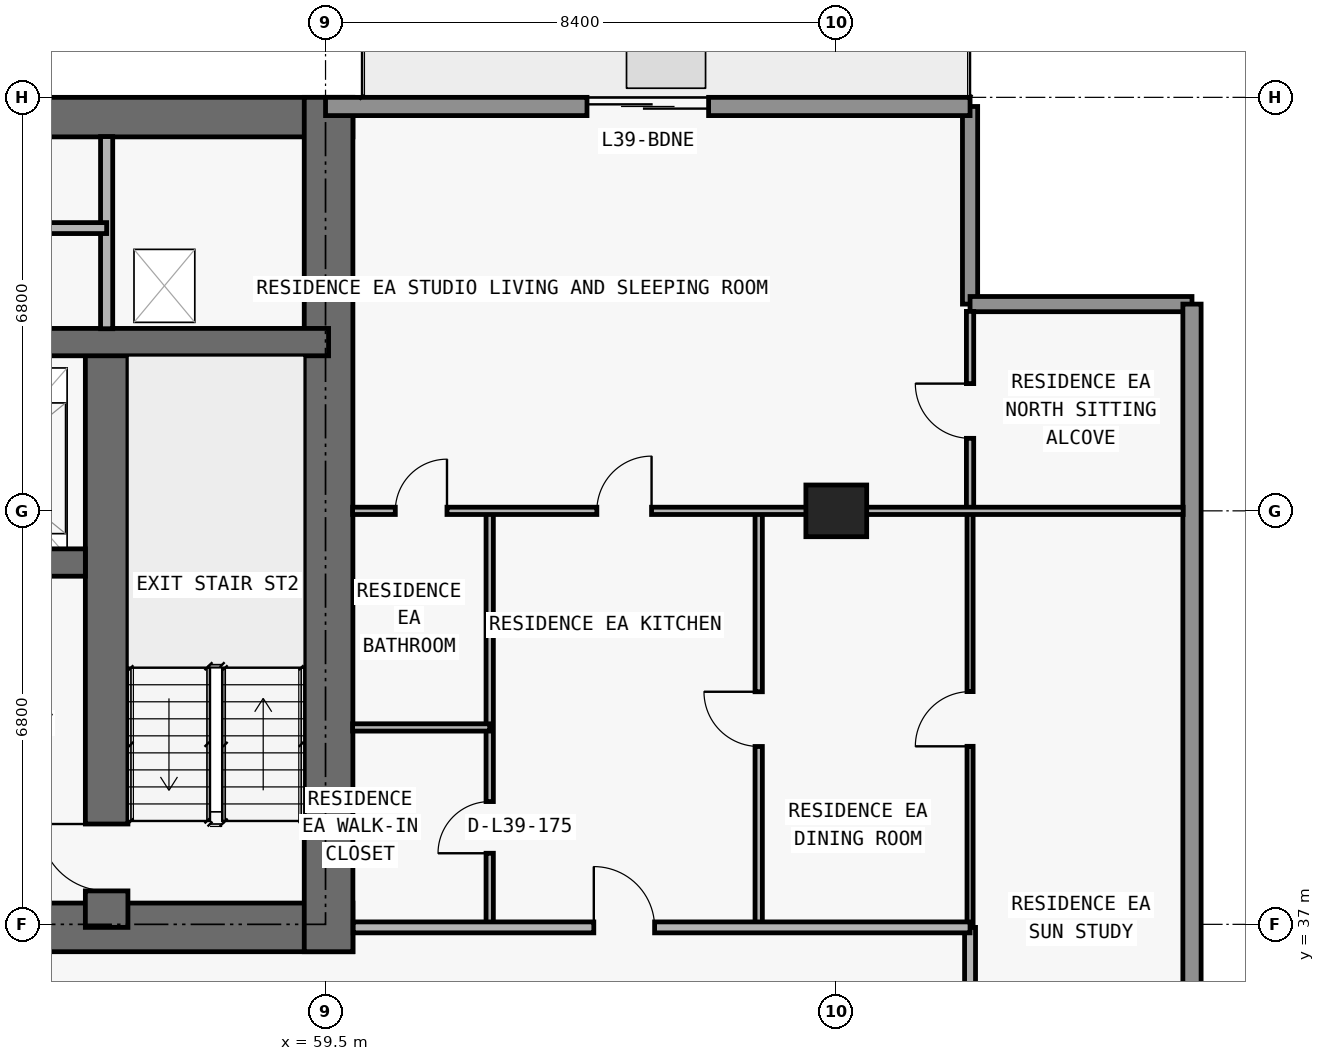
"""IFC4 building model, lengths in metres.
Left out: names, types, materials, properties, quantities, classifications, styles, units other than length and angle.
Written with IfcOpenShell. Run it as: python <this file> out.ifc"""

import sys

from ifc_helpers import new_model, si_unit, direction, frame, frame_2d, origin, origin_2d, place, context, subcontext, project, spatial, rectangle, extrude, element, fill, save


model = new_model("IFC4")
c1 = context("Model", 3, precision=1e-05, world=origin(), true_north=direction((0.0, 1.0)))
c2 = subcontext(c1, "Body", "Model", "MODEL_VIEW")
j1 = project(units=[si_unit("LENGTHUNIT", "METRE"), si_unit("PLANEANGLEUNIT", "RADIAN")], contexts=[c1])
p1 = place(None, origin())
s1 = spatial("IfcSite", under=j1, at=p1, CompositionType="ELEMENT")
p2 = place(p1, origin())
s2 = spatial("IfcBuilding", under=s1, at=p2, CompositionType="ELEMENT")
p3 = place(p2, frame((0.0, 0.0, 142.2)))
s3 = spatial("IfcBuildingStorey", under=s2, at=p3, CompositionType="ELEMENT", Elevation=142.2)
p4 = place(p3, frame((67.9, 43.8, 0.0), z_axis=(0.0, 0.0, 1.0), x_axis=(1.0, 0.0, 0.0)))
e1 = element("IfcColumn", 1, at=p4, inside=s3, PredefinedType="COLUMN", context=c2, shape_type="SweptSolid", body=[
    extrude(rectangle(XDim=1.0, YDim=0.85, at=origin_2d()), origin(), (0.0, 0.0, 1.0), 3.05),
])
p5 = place(p3, frame((17.85, 36.95, 0.0), z_axis=(0.0, 0.0, 1.0), x_axis=(1.0, 0.0, 0.0)))
e2 = element("IfcWall", 2, at=p5, inside=s3, PredefinedType="SHEAR", context=c2, shape_type="SweptSolid", body=[
    extrude(rectangle(XDim=42.1, YDim=0.8, at=frame_2d((21.05, 0.0))), origin(), (0.0, 0.0, 1.0), 3.05),
])
p6 = place(p5, frame((14.45, 0.0, 0.0)))
e3 = element("IfcOpeningElement", 3, at=p6, cuts=e2, PredefinedType="OPENING", context=c2, shape_type="SweptSolid", body=[
    extrude(rectangle(XDim=1.1, YDim=2.15, at=frame_2d((0.55, 1.075))), frame((0.0, 0.41, 0.0), z_axis=(0.0, -1.0, 0.0), x_axis=(1.0, 0.0, 0.0)), (0.0, 0.0, 1.0), 0.82),
])
p7 = place(p5, frame((6.3, 0.0, 0.0)))
e4 = element("IfcOpeningElement", 4, at=p7, cuts=e2, PredefinedType="OPENING", context=c2, shape_type="SweptSolid", body=[
    extrude(rectangle(XDim=1.05, YDim=2.15, at=frame_2d((0.525, 1.075))), frame((0.0, 0.41, 0.0), z_axis=(0.0, -1.0, 0.0), x_axis=(1.0, 0.0, 0.0)), (0.0, 0.0, 1.0), 0.82),
])
p8 = place(p5, frame((34.8, 0.0, 0.0)))
e5 = element("IfcOpeningElement", 5, at=p8, cuts=e2, PredefinedType="OPENING", context=c2, shape_type="SweptSolid", body=[
    extrude(rectangle(XDim=1.05, YDim=2.15, at=frame_2d((0.525, 1.075))), frame((0.0, 0.41, 0.0), z_axis=(0.0, -1.0, 0.0), x_axis=(1.0, 0.0, 0.0)), (0.0, 0.0, 1.0), 0.82),
])
p9 = place(p5, frame((10.913, 0.0, 0.0)))
e6 = element("IfcOpeningElement", 6, at=p9, cuts=e2, PredefinedType="OPENING", context=c2, shape_type="SweptSolid", body=[
    extrude(rectangle(XDim=1.05, YDim=2.15, at=frame_2d((0.525, 1.075))), frame((0.0, 0.41, 0.0), z_axis=(0.0, -1.0, 0.0), x_axis=(1.0, 0.0, 0.0)), (0.0, 0.0, 1.0), 0.82),
])
p10 = place(p5, frame((24.15, 0.0, 0.0)))
e7 = element("IfcOpeningElement", 7, at=p10, cuts=e2, PredefinedType="OPENING", context=c2, shape_type="SweptSolid", body=[
    extrude(rectangle(XDim=1.05, YDim=2.15, at=frame_2d((0.525, 1.075))), frame((0.0, 0.41, 0.0), z_axis=(0.0, -1.0, 0.0), x_axis=(1.0, 0.0, 0.0)), (0.0, 0.0, 1.0), 0.82),
])
p11 = place(p3, frame((17.85, 50.275, 0.0), z_axis=(0.0, 0.0, 1.0), x_axis=(1.0, 0.0, 0.0)))
e8 = element("IfcWall", 8, at=p11, inside=s3, PredefinedType="SHEAR", context=c2, shape_type="SweptSolid", body=[
    extrude(rectangle(XDim=42.1, YDim=0.65, at=frame_2d((21.05, 0.0))), origin(), (0.0, 0.0, 1.0), 3.05),
])
p12 = place(p3, frame((59.55, 36.55, 0.0), z_axis=(0.0, 0.0, 1.0), x_axis=(0.0, 1.0, 0.0)))
e9 = element("IfcWall", 9, at=p12, inside=s3, PredefinedType="SHEAR", context=c2, shape_type="SweptSolid", body=[
    extrude(rectangle(XDim=14.05, YDim=0.8, at=frame_2d((7.025, 0.0))), origin(), (0.0, 0.0, 1.0), 3.05),
])
p13 = place(p3, frame((55.9, 36.95, 0.0), z_axis=(0.0, 0.0, 1.0), x_axis=(0.0, 1.0, 0.0)))
e10 = element("IfcWall", 10, at=p13, inside=s3, PredefinedType="SHEAR", context=c2, shape_type="SweptSolid", body=[
    extrude(rectangle(XDim=9.625, YDim=0.7, at=frame_2d((4.812, 0.0))), origin(), (0.0, 0.0, 1.0), 3.05),
])
p14 = place(p13, frame((0.6, 0.0, 0.0)))
e11 = element("IfcOpeningElement", 11, at=p14, cuts=e10, PredefinedType="OPENING", context=c2, shape_type="SweptSolid", body=[
    extrude(rectangle(XDim=1.1, YDim=2.15, at=frame_2d((0.55, 1.075))), frame((0.0, 0.36, 0.0), z_axis=(0.0, -1.0, 0.0), x_axis=(1.0, 0.0, 0.0)), (0.0, 0.0, 1.0), 0.72),
])
p15 = place(p3, frame((22.25, 42.95, 0.0), z_axis=(0.0, 0.0, 1.0), x_axis=(1.0, 0.0, 0.0)))
e12 = element("IfcWall", 12, at=p15, inside=s3, PredefinedType="SHEAR", context=c2, shape_type="SweptSolid", body=[
    extrude(rectangle(XDim=33.3, YDim=0.45, at=frame_2d((16.65, 0.0))), origin(), (0.0, 0.0, 1.0), 3.05),
])
p16 = place(p15, frame((1.05, 0.0, 0.0)))
e13 = element("IfcOpeningElement", 13, at=p16, cuts=e12, PredefinedType="OPENING", context=c2, shape_type="SweptSolid", body=[
    extrude(rectangle(XDim=1.2, YDim=2.2, at=frame_2d((0.6, 1.1))), frame((0.0, 0.235, 0.0), z_axis=(0.0, -1.0, 0.0), x_axis=(1.0, 0.0, 0.0)), (0.0, 0.0, 1.0), 0.47),
])
p17 = place(p15, frame((31.05, 0.0, 0.0)))
e14 = element("IfcOpeningElement", 14, at=p17, cuts=e12, PredefinedType="OPENING", context=c2, shape_type="SweptSolid", body=[
    extrude(rectangle(XDim=1.2, YDim=2.2, at=frame_2d((0.6, 1.1))), frame((0.0, 0.235, 0.0), z_axis=(0.0, -1.0, 0.0), x_axis=(1.0, 0.0, 0.0)), (0.0, 0.0, 1.0), 0.47),
])
p18 = place(p15, frame((21.4, 0.0, 0.0)))
e15 = element("IfcOpeningElement", 15, at=p18, cuts=e12, PredefinedType="OPENING", context=c2, shape_type="SweptSolid", body=[
    extrude(rectangle(XDim=1.1, YDim=2.2, at=frame_2d((0.55, 1.1))), frame((0.0, 0.235, 0.0), z_axis=(0.0, -1.0, 0.0), x_axis=(1.0, 0.0, 0.0)), (0.0, 0.0, 1.0), 0.47),
])
p19 = place(p15, frame((24.0, 0.0, 0.0)))
e16 = element("IfcOpeningElement", 16, at=p19, cuts=e12, PredefinedType="OPENING", context=c2, shape_type="SweptSolid", body=[
    extrude(rectangle(XDim=1.1, YDim=2.2, at=frame_2d((0.55, 1.1))), frame((0.0, 0.235, 0.0), z_axis=(0.0, -1.0, 0.0), x_axis=(1.0, 0.0, 0.0)), (0.0, 0.0, 1.0), 0.47),
])
p20 = place(p15, frame((3.625, 0.0, 0.0)))
e17 = element("IfcOpeningElement", 17, at=p20, cuts=e12, PredefinedType="OPENING", context=c2, shape_type="SweptSolid", body=[
    extrude(rectangle(XDim=1.05, YDim=2.15, at=frame_2d((0.525, 1.075))), frame((0.0, 0.235, 0.0), z_axis=(0.0, -1.0, 0.0), x_axis=(1.0, 0.0, 0.0)), (0.0, 0.0, 1.0), 0.47),
])
p21 = place(p15, frame((28.675, 0.0, 0.0)))
e18 = element("IfcOpeningElement", 18, at=p21, cuts=e12, PredefinedType="OPENING", context=c2, shape_type="SweptSolid", body=[
    extrude(rectangle(XDim=1.05, YDim=2.15, at=frame_2d((0.525, 1.075))), frame((0.0, 0.235, 0.0), z_axis=(0.0, -1.0, 0.0), x_axis=(1.0, 0.0, 0.0)), (0.0, 0.0, 1.0), 0.47),
])
p22 = place(p15, frame((15.975, 0.0, 0.0)))
e19 = element("IfcOpeningElement", 19, at=p22, cuts=e12, PredefinedType="OPENING", context=c2, shape_type="SweptSolid", body=[
    extrude(rectangle(XDim=1.0, YDim=2.2, at=frame_2d((0.5, 1.1))), frame((0.0, 0.235, 0.0), z_axis=(0.0, -1.0, 0.0), x_axis=(1.0, 0.0, 0.0)), (0.0, 0.0, 1.0), 0.47),
])
p23 = place(p3, frame((18.25, 46.575, 0.0), z_axis=(0.0, 0.0, 1.0), x_axis=(1.0, 0.0, 0.0)))
e20 = element("IfcWall", 20, at=p23, inside=s3, PredefinedType="SHEAR", context=c2, shape_type="SweptSolid", body=[
    extrude(rectangle(XDim=41.3, YDim=0.45, at=frame_2d((20.65, 0.0))), origin(), (0.0, 0.0, 1.0), 3.05),
])
p24 = place(p23, frame((7.65, 0.0, 0.0)))
e21 = element("IfcOpeningElement", 21, at=p24, cuts=e20, PredefinedType="OPENING", context=c2, shape_type="SweptSolid", body=[
    extrude(rectangle(XDim=1.0, YDim=2.2, at=frame_2d((0.5, 1.1))), frame((0.0, 0.235, 0.0), z_axis=(0.0, -1.0, 0.0), x_axis=(1.0, 0.0, 0.0)), (0.0, 0.0, 1.0), 0.47),
])
p25 = place(p23, frame((32.675, 0.0, 0.0)))
e22 = element("IfcOpeningElement", 22, at=p25, cuts=e20, PredefinedType="OPENING", context=c2, shape_type="SweptSolid", body=[
    extrude(rectangle(XDim=1.05, YDim=2.15, at=frame_2d((0.525, 1.075))), frame((0.0, 0.235, 0.0), z_axis=(0.0, -1.0, 0.0), x_axis=(1.0, 0.0, 0.0)), (0.0, 0.0, 1.0), 0.47),
])
p26 = place(p3, frame((70.1, 50.45, 0.0), z_axis=(0.0, 0.0, 1.0), x_axis=(0.0, -1.0, 0.0)))
e23 = element("IfcWall", 23, at=p26, inside=s3, PredefinedType="ELEMENTEDWALL", context=c2, shape_type="SweptSolid", body=[
    extrude(rectangle(XDim=3.25, YDim=0.25, at=frame_2d((1.625, 0.0))), origin(), (0.0, 0.0, 1.0), 3.05),
])
p27 = place(p3, frame((70.1, 47.2, 0.0), z_axis=(0.0, 0.0, 1.0), x_axis=(1.0, 0.0, 0.0)))
e24 = element("IfcWall", 24, at=p27, inside=s3, PredefinedType="ELEMENTEDWALL", context=c2, shape_type="SweptSolid", body=[
    extrude(rectangle(XDim=3.65, YDim=0.25, at=frame_2d((1.825, 0.0))), origin(), (0.0, 0.0, 1.0), 3.05),
])
p28 = place(p3, frame((73.75, 47.2, 0.0), z_axis=(0.0, 0.0, 1.0), x_axis=(0.0, -1.0, 0.0)))
e25 = element("IfcWall", 25, at=p28, inside=s3, PredefinedType="STANDARD", context=c2, shape_type="SweptSolid", body=[
    extrude(rectangle(XDim=19.2, YDim=0.3, at=frame_2d((9.6, 0.0))), origin(), (0.0, 0.0, 1.0), 3.05),
])
p29 = place(p3, frame((59.5, 50.45, 0.0), z_axis=(0.0, 0.0, 1.0), x_axis=(1.0, 0.0, 0.0)))
e26 = element("IfcWall", 26, at=p29, inside=s3, PredefinedType="STANDARD", context=c2, shape_type="SweptSolid", body=[
    extrude(rectangle(XDim=10.6, YDim=0.3, at=frame_2d((5.3, 0.0))), origin(), (0.0, 0.0, 1.0), 3.05),
])
p30 = place(p29, frame((4.3, 0.0, 0.0)))
e27 = element("IfcOpeningElement", 27, at=p30, cuts=e26, PredefinedType="OPENING", context=c2, shape_type="SweptSolid", body=[
    extrude(rectangle(XDim=2.0, YDim=2.3, at=frame_2d((1.0, 1.15))), frame((0.0, 0.16, 0.0), z_axis=(0.0, -1.0, 0.0), x_axis=(1.0, 0.0, 0.0)), (0.0, 0.0, 1.0), 0.32),
])
p31 = place(p3, frame((55.9, 46.795, 0.0), z_axis=(0.0, 0.0, 1.0), x_axis=(0.0, 1.0, 0.0)))
e28 = element("IfcWall", 28, at=p31, inside=s3, PredefinedType="PARTITIONING", context=c2, shape_type="SweptSolid", body=[
    extrude(rectangle(XDim=3.16, YDim=0.2, at=frame_2d((1.58, 0.0))), origin(), (0.0, 0.0, 1.0), 3.05),
])
p32 = place(p3, frame((62.2, 36.95, 0.0), z_axis=(0.0, 0.0, 1.0), x_axis=(0.0, 1.0, 0.0)))
e29 = element("IfcWall", 29, at=p32, inside=s3, PredefinedType="PARTITIONING", context=c2, shape_type="SweptSolid", body=[
    extrude(rectangle(XDim=6.85, YDim=0.12, at=frame_2d((3.425, 0.0))), origin(), (0.0, 0.0, 1.0), 3.05),
])
p33 = place(p32, frame((1.219, 0.0, 0.0)))
e30 = element("IfcOpeningElement", 30, at=p33, cuts=e29, PredefinedType="OPENING", context=c2, shape_type="SweptSolid", body=[
    extrude(rectangle(XDim=0.85, YDim=2.1, at=frame_2d((0.425, 1.05))), frame((0.0, 0.07, 0.0), z_axis=(0.0, -1.0, 0.0), x_axis=(1.0, 0.0, 0.0)), (0.0, 0.0, 1.0), 0.14),
])
p34 = place(p3, frame((66.624, 36.95, 0.0), z_axis=(0.0, 0.0, 1.0), x_axis=(0.0, 1.0, 0.0)))
e31 = element("IfcWall", 31, at=p34, inside=s3, PredefinedType="PARTITIONING", context=c2, shape_type="SweptSolid", body=[
    extrude(rectangle(XDim=6.85, YDim=0.12, at=frame_2d((3.425, 0.0))), origin(), (0.0, 0.0, 1.0), 3.05),
])
p35 = place(p34, frame((2.975, 0.0, 0.0)))
e32 = element("IfcOpeningElement", 32, at=p35, cuts=e31, PredefinedType="OPENING", context=c2, shape_type="SweptSolid", body=[
    extrude(rectangle(XDim=0.9, YDim=2.15, at=frame_2d((0.45, 1.075))), frame((0.0, 0.07, 0.0), z_axis=(0.0, -1.0, 0.0), x_axis=(1.0, 0.0, 0.0)), (0.0, 0.0, 1.0), 0.14),
])
p36 = place(p3, frame((70.1, 34.205, 0.0), z_axis=(0.0, 0.0, 1.0), x_axis=(0.0, 1.0, 0.0)))
e33 = element("IfcWall", 33, at=p36, inside=s3, PredefinedType="PARTITIONING", context=c2, shape_type="SweptSolid", body=[
    extrude(rectangle(XDim=2.745, YDim=0.18, at=frame_2d((1.373, 0.0))), origin(), (0.0, 0.0, 1.0), 3.05),
])
p37 = place(p3, frame((70.1, 36.955, 0.0), z_axis=(0.0, 0.0, 1.0), x_axis=(0.0, 1.0, 0.0)))
e34 = element("IfcWall", 34, at=p37, inside=s3, PredefinedType="MOVABLE", context=c2, shape_type="SweptSolid", body=[
    extrude(rectangle(XDim=6.845, YDim=0.1, at=frame_2d((3.422, 0.0))), origin(), (0.0, 0.0, 1.0), 3.05),
])
p38 = place(p37, frame((2.972, 0.0, 0.0)))
e35 = element("IfcOpeningElement", 35, at=p38, cuts=e34, PredefinedType="OPENING", context=c2, shape_type="SweptSolid", body=[
    extrude(rectangle(XDim=0.9, YDim=2.15, at=frame_2d((0.45, 1.075))), frame((0.0, 0.06, 0.0), z_axis=(0.0, -1.0, 0.0), x_axis=(1.0, 0.0, 0.0)), (0.0, 0.0, 1.0), 0.12),
])
p39 = place(p3, frame((70.1, 43.805, 0.0), z_axis=(0.0, 0.0, 1.0), x_axis=(0.0, 1.0, 0.0)))
e36 = element("IfcWall", 36, at=p39, inside=s3, PredefinedType="PARTITIONING", context=c2, shape_type="SweptSolid", body=[
    extrude(rectangle(XDim=3.275, YDim=0.12, at=frame_2d((1.638, 0.0))), origin(), (0.0, 0.0, 1.0), 3.05),
])
p40 = place(p39, frame((1.188, 0.0, 0.0)))
e37 = element("IfcOpeningElement", 37, at=p40, cuts=e36, PredefinedType="OPENING", context=c2, shape_type="SweptSolid", body=[
    extrude(rectangle(XDim=0.9, YDim=2.15, at=frame_2d((0.45, 1.075))), frame((0.0, 0.07, 0.0), z_axis=(0.0, -1.0, 0.0), x_axis=(1.0, 0.0, 0.0)), (0.0, 0.0, 1.0), 0.14),
])
p41 = place(p3, frame((59.955, 36.95, 0.0), z_axis=(0.0, 0.0, 1.0), x_axis=(1.0, 0.0, 0.0)))
e38 = element("IfcWall", 38, at=p41, inside=s3, PredefinedType="PARTITIONING", context=c2, shape_type="SweptSolid", body=[
    extrude(rectangle(XDim=10.145, YDim=0.18, at=frame_2d((5.073, 0.0))), origin(), (0.0, 0.0, 1.0), 3.05),
])
p42 = place(p41, frame((3.957, 0.0, 0.0)))
e39 = element("IfcOpeningElement", 39, at=p42, cuts=e38, PredefinedType="OPENING", context=c2, shape_type="SweptSolid", body=[
    extrude(rectangle(XDim=1.0, YDim=2.2, at=frame_2d((0.5, 1.1))), frame((0.0, 0.1, 0.0), z_axis=(0.0, -1.0, 0.0), x_axis=(1.0, 0.0, 0.0)), (0.0, 0.0, 1.0), 0.2),
])
p43 = place(p3, frame((59.945, 40.238, 0.0), z_axis=(0.0, 0.0, 1.0), x_axis=(1.0, 0.0, 0.0)))
e40 = element("IfcWall", 40, at=p43, inside=s3, PredefinedType="PARTITIONING", context=c2, shape_type="SweptSolid", body=[
    extrude(rectangle(XDim=2.255, YDim=0.12, at=frame_2d((1.127, 0.0))), origin(), (0.0, 0.0, 1.0), 3.05),
])
p44 = place(p3, frame((59.945, 43.8, 0.0), z_axis=(0.0, 0.0, 1.0), x_axis=(1.0, 0.0, 0.0)))
e41 = element("IfcWall", 41, at=p44, inside=s3, PredefinedType="PARTITIONING", context=c2, shape_type="SweptSolid", body=[
    extrude(rectangle(XDim=13.66, YDim=0.12, at=frame_2d((6.83, 0.0))), origin(), (0.0, 0.0, 1.0), 2.339),
])
p45 = place(p44, frame((4.017, 0.0, 0.0)))
e42 = element("IfcOpeningElement", 42, at=p45, cuts=e41, PredefinedType="OPENING", context=c2, shape_type="SweptSolid", body=[
    extrude(rectangle(XDim=0.9, YDim=2.15, at=frame_2d((0.45, 1.075))), frame((0.0, 0.07, 0.0), z_axis=(0.0, -1.0, 0.0), x_axis=(1.0, 0.0, 0.0)), (0.0, 0.0, 1.0), 0.14),
])
p46 = place(p44, frame((0.702, 0.0, 0.0)))
e43 = element("IfcOpeningElement", 43, at=p46, cuts=e41, PredefinedType="OPENING", context=c2, shape_type="SweptSolid", body=[
    extrude(rectangle(XDim=0.85, YDim=2.1, at=frame_2d((0.425, 1.05))), frame((0.0, 0.07, 0.0), z_axis=(0.0, -1.0, 0.0), x_axis=(1.0, 0.0, 0.0)), (0.0, 0.0, 1.0), 0.14),
])
p47 = place(p3, frame((41.2, 48.45, 0.0), z_axis=(0.0, 0.0, 1.0), x_axis=(1.0, 0.0, 0.0)))
e44 = element("IfcWall", 44, at=p47, inside=s3, PredefinedType="PARTITIONING", context=c2, shape_type="SweptSolid", body=[
    extrude(rectangle(XDim=14.7, YDim=0.18, at=frame_2d((7.35, 0.0))), origin(), (0.0, 0.0, 1.0), 3.05),
])
p48 = place(p47, frame((1.85, 0.0, 0.0)))
e45 = element("IfcOpeningElement", 45, at=p48, cuts=e44, PredefinedType="OPENING", context=c2, shape_type="SweptSolid", body=[
    extrude(rectangle(XDim=1.2, YDim=2.2, at=frame_2d((0.6, 1.1))), frame((0.0, 0.1, 0.0), z_axis=(0.0, -1.0, 0.0), x_axis=(1.0, 0.0, 0.0)), (0.0, 0.0, 1.0), 0.2),
])
p49 = place(p47, frame((6.75, 0.0, 0.0)))
e46 = element("IfcOpeningElement", 46, at=p49, cuts=e44, PredefinedType="OPENING", context=c2, shape_type="SweptSolid", body=[
    extrude(rectangle(XDim=1.2, YDim=2.2, at=frame_2d((0.6, 1.1))), frame((0.0, 0.1, 0.0), z_axis=(0.0, -1.0, 0.0), x_axis=(1.0, 0.0, 0.0)), (0.0, 0.0, 1.0), 0.2),
])
p50 = place(p47, frame((11.825, 0.0, 0.0)))
e47 = element("IfcOpeningElement", 47, at=p50, cuts=e44, PredefinedType="OPENING", context=c2, shape_type="SweptSolid", body=[
    extrude(rectangle(XDim=0.85, YDim=2.1, at=frame_2d((0.425, 1.05))), frame((0.0, 0.1, 0.0), z_axis=(0.0, -1.0, 0.0), x_axis=(1.0, 0.0, 0.0)), (0.0, 0.0, 1.0), 0.2),
])
p51 = place(p30, origin())
e48 = element("IfcDoor", 48, at=p51, inside=s3, OperationType="DOUBLE_DOOR_SLIDING", PredefinedType="DOOR", context=c2, shape_type="SweptSolid", body=[
    extrude(rectangle(XDim=2.0, YDim=2.3, at=frame_2d((1.0, 1.15))), frame((0.0, 0.025, 0.0), z_axis=(0.0, -1.0, 0.0), x_axis=(1.0, 0.0, 0.0)), (0.0, 0.0, 1.0), 0.05),
])
fill(e27, e48)
p52 = place(p14, origin())
e49 = element("IfcDoor", 49, at=p52, inside=s3, OperationType="SINGLE_SWING_RIGHT", PredefinedType="DOOR", context=c2, shape_type="SweptSolid", body=[
    extrude(rectangle(XDim=1.1, YDim=2.15, at=frame_2d((0.55, 1.075))), frame((0.0, 0.025, 0.0), z_axis=(0.0, -1.0, 0.0), x_axis=(1.0, 0.0, 0.0)), (0.0, 0.0, 1.0), 0.05),
])
fill(e11, e49)
p53 = place(p35, origin())
e50 = element("IfcDoor", 50, at=p53, inside=s3, OperationType="SINGLE_SWING_RIGHT", PredefinedType="DOOR", context=c2, shape_type="SweptSolid", body=[
    extrude(rectangle(XDim=0.9, YDim=2.15, at=frame_2d((0.45, 1.075))), frame((0.0, 0.025, 0.0), z_axis=(0.0, -1.0, 0.0), x_axis=(1.0, 0.0, 0.0)), (0.0, 0.0, 1.0), 0.05),
])
fill(e32, e50)
p54 = place(p42, origin())
e51 = element("IfcDoor", 51, at=p54, inside=s3, OperationType="SINGLE_SWING_LEFT", PredefinedType="DOOR", context=c2, shape_type="SweptSolid", body=[
    extrude(rectangle(XDim=1.0, YDim=2.2, at=frame_2d((0.5, 1.1))), frame((0.0, 0.025, 0.0), z_axis=(0.0, -1.0, 0.0), x_axis=(1.0, 0.0, 0.0)), (0.0, 0.0, 1.0), 0.05),
])
fill(e39, e51)
p55 = place(p45, origin())
e52 = element("IfcDoor", 52, at=p55, inside=s3, OperationType="SINGLE_SWING_RIGHT", PredefinedType="DOOR", context=c2, shape_type="SweptSolid", body=[
    extrude(rectangle(XDim=0.9, YDim=2.15, at=frame_2d((0.45, 1.075))), frame((0.0, 0.025, 0.0), z_axis=(0.0, -1.0, 0.0), x_axis=(1.0, 0.0, 0.0)), (0.0, 0.0, 1.0), 0.05),
])
fill(e42, e52)
p56 = place(p33, origin())
e53 = element("IfcDoor", 53, at=p56, inside=s3, OperationType="SINGLE_SWING_LEFT", PredefinedType="DOOR", context=c2, shape_type="SweptSolid", body=[
    extrude(rectangle(XDim=0.85, YDim=2.1, at=frame_2d((0.425, 1.05))), frame((0.0, 0.025, 0.0), z_axis=(0.0, -1.0, 0.0), x_axis=(1.0, 0.0, 0.0)), (0.0, 0.0, 1.0), 0.05),
])
fill(e30, e53)
p57 = place(p46, origin())
e54 = element("IfcDoor", 54, at=p57, inside=s3, OperationType="SINGLE_SWING_RIGHT", PredefinedType="DOOR", context=c2, shape_type="SweptSolid", body=[
    extrude(rectangle(XDim=0.85, YDim=2.1, at=frame_2d((0.425, 1.05))), frame((0.0, 0.025, 0.0), z_axis=(0.0, -1.0, 0.0), x_axis=(1.0, 0.0, 0.0)), (0.0, 0.0, 1.0), 0.05),
])
fill(e43, e54)
p58 = place(p38, origin())
e55 = element("IfcDoor", 55, at=p58, inside=s3, OperationType="SINGLE_SWING_LEFT", PredefinedType="DOOR", context=c2, shape_type="SweptSolid", body=[
    extrude(rectangle(XDim=0.9, YDim=2.15, at=frame_2d((0.45, 1.075))), frame((0.0, 0.025, 0.0), z_axis=(0.0, -1.0, 0.0), x_axis=(1.0, 0.0, 0.0)), (0.0, 0.0, 1.0), 0.05),
])
fill(e35, e55)
p59 = place(p40, origin())
e56 = element("IfcDoor", 56, at=p59, inside=s3, OperationType="SINGLE_SWING_RIGHT", PredefinedType="DOOR", context=c2, shape_type="SweptSolid", body=[
    extrude(rectangle(XDim=0.9, YDim=2.15, at=frame_2d((0.45, 1.075))), frame((0.0, 0.025, 0.0), z_axis=(0.0, -1.0, 0.0), x_axis=(1.0, 0.0, 0.0)), (0.0, 0.0, 1.0), 0.05),
])
fill(e37, e56)
save(model, sys.argv[1])
